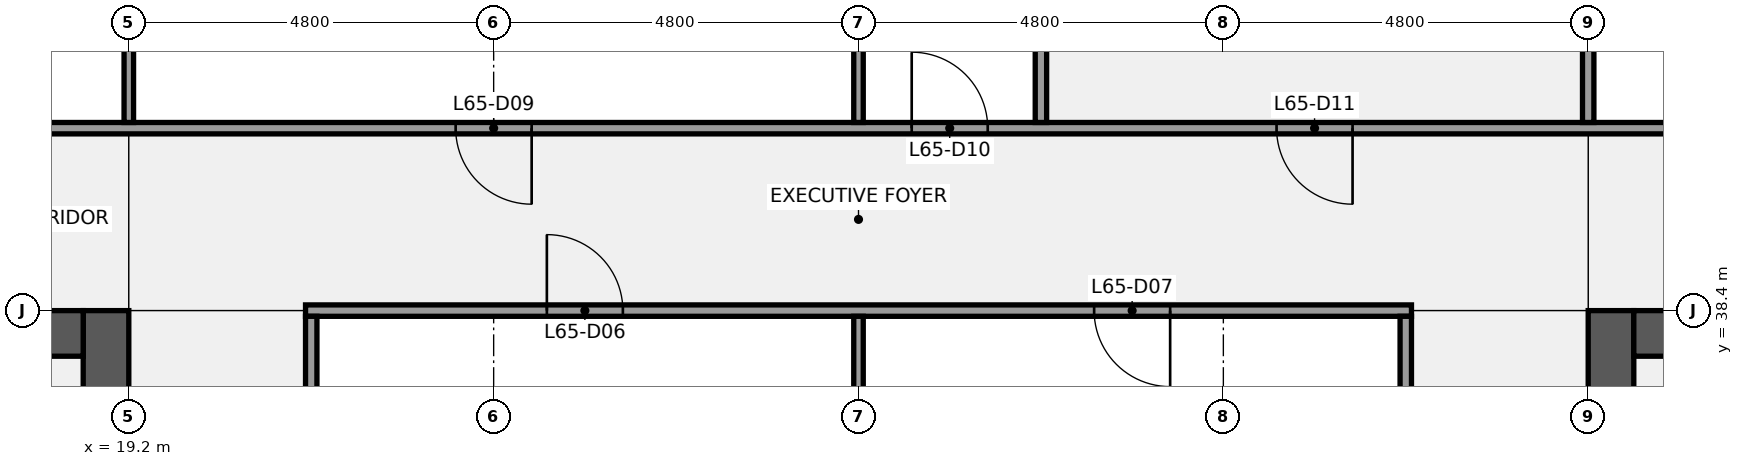
"""IFC4 building model, lengths in metres.
Left out: names, types, materials, properties, quantities, classifications, styles, units other than length and angle.
Written with IfcOpenShell. Run it as: python <this file> out.ifc"""

import sys

from ifc_helpers import new_model, si_unit, direction, frame, frame_2d, origin, place, context, subcontext, project, spatial, rectangle, extrude, element, fill, save


model = new_model("IFC4")
c1 = context("Model", 3, precision=1e-05, world=origin(), true_north=direction((0.0, 1.0)))
c2 = subcontext(c1, "Body", "Model", "MODEL_VIEW")
j1 = project(units=[si_unit("LENGTHUNIT", "METRE"), si_unit("PLANEANGLEUNIT", "RADIAN")], contexts=[c1])
p1 = place(None, origin())
s1 = spatial("IfcSite", under=j1, at=p1, CompositionType="ELEMENT")
p2 = place(p1, origin())
s2 = spatial("IfcBuilding", under=s1, at=p2, CompositionType="ELEMENT")
p3 = place(p2, frame((0.0, 0.0, 298.3)))
s3 = spatial("IfcBuildingStorey", under=s2, at=p3, CompositionType="ELEMENT", Elevation=298.3)
p4 = place(p3, frame((18.9, 38.4, 0.0), z_axis=(0.0, 0.0, 1.0), x_axis=(0.0, -1.0, 0.0)))
e1 = element("IfcWall", 1, at=p4, inside=s3, PredefinedType="SHEAR", context=c2, shape_type="SweptSolid", body=[
    extrude(rectangle(XDim=28.8, YDim=0.6, at=frame_2d((14.4, 0.0))), origin(), (0.0, 0.0, 1.0), 3.84),
])
p5 = place(p4, frame((18.3, 0.0, 0.0)))
e2 = element("IfcOpeningElement", 2, at=p5, cuts=e1, PredefinedType="OPENING", context=c2, shape_type="SweptSolid", body=[
    extrude(rectangle(XDim=1.8, YDim=2.1, at=frame_2d((0.9, 1.05))), frame((0.0, 0.31, 0.0), z_axis=(0.0, -1.0, 0.0), x_axis=(1.0, 0.0, 0.0)), (0.0, 0.0, 1.0), 0.62),
])
p6 = place(p4, frame((8.7, 0.0, 0.0)))
e3 = element("IfcOpeningElement", 3, at=p6, cuts=e1, PredefinedType="OPENING", context=c2, shape_type="SweptSolid", body=[
    extrude(rectangle(XDim=1.8, YDim=2.1, at=frame_2d((0.9, 1.05))), frame((0.0, 0.31, 0.0), z_axis=(0.0, -1.0, 0.0), x_axis=(1.0, 0.0, 0.0)), (0.0, 0.0, 1.0), 0.62),
])
p7 = place(p3, frame((14.4, 38.1, 0.0), z_axis=(0.0, 0.0, 1.0), x_axis=(1.0, 0.0, 0.0)))
e4 = element("IfcWall", 4, at=p7, inside=s3, PredefinedType="SHEAR", context=c2, shape_type="SweptSolid", body=[
    extrude(rectangle(XDim=4.2, YDim=0.6, at=frame_2d((2.1, 0.0))), origin(), (0.0, 0.0, 1.0), 3.84),
])
p8 = place(p7, frame((1.85, 0.0, 0.0)))
e5 = element("IfcOpeningElement", 5, at=p8, cuts=e4, PredefinedType="OPENING", context=c2, shape_type="SweptSolid", body=[
    extrude(rectangle(XDim=1.1, YDim=2.1, at=frame_2d((0.55, 1.05))), frame((0.0, 0.31, 0.0), z_axis=(0.0, -1.0, 0.0), x_axis=(1.0, 0.0, 0.0)), (0.0, 0.0, 1.0), 0.62),
])
p9 = place(p3, frame((38.7, 9.6, 0.0), z_axis=(0.0, 0.0, 1.0), x_axis=(0.0, 1.0, 0.0)))
e6 = element("IfcWall", 6, at=p9, inside=s3, PredefinedType="SHEAR", context=c2, shape_type="SweptSolid", body=[
    extrude(rectangle(XDim=28.8, YDim=0.6, at=frame_2d((14.4, 0.0))), origin(), (0.0, 0.0, 1.0), 3.84),
])
p10 = place(p9, frame((8.7, 0.0, 0.0)))
e7 = element("IfcOpeningElement", 7, at=p10, cuts=e6, PredefinedType="OPENING", context=c2, shape_type="SweptSolid", body=[
    extrude(rectangle(XDim=1.8, YDim=2.1, at=frame_2d((0.9, 1.05))), frame((0.0, 0.31, 0.0), z_axis=(0.0, -1.0, 0.0), x_axis=(1.0, 0.0, 0.0)), (0.0, 0.0, 1.0), 0.62),
])
p11 = place(p9, frame((18.3, 0.0, 0.0)))
e8 = element("IfcOpeningElement", 8, at=p11, cuts=e6, PredefinedType="OPENING", context=c2, shape_type="SweptSolid", body=[
    extrude(rectangle(XDim=1.8, YDim=2.1, at=frame_2d((0.9, 1.05))), frame((0.0, 0.31, 0.0), z_axis=(0.0, -1.0, 0.0), x_axis=(1.0, 0.0, 0.0)), (0.0, 0.0, 1.0), 0.62),
])
p12 = place(p3, frame((39.0, 38.1, 0.0), z_axis=(0.0, 0.0, 1.0), x_axis=(1.0, 0.0, 0.0)))
e9 = element("IfcWall", 9, at=p12, inside=s3, PredefinedType="SHEAR", context=c2, shape_type="SweptSolid", body=[
    extrude(rectangle(XDim=4.2, YDim=0.6, at=frame_2d((2.1, 0.0))), origin(), (0.0, 0.0, 1.0), 3.84),
])
p13 = place(p12, frame((1.25, 0.0, 0.0)))
e10 = element("IfcOpeningElement", 10, at=p13, cuts=e9, PredefinedType="OPENING", context=c2, shape_type="SweptSolid", body=[
    extrude(rectangle(XDim=1.1, YDim=2.1, at=frame_2d((0.55, 1.05))), frame((0.0, 0.31, 0.0), z_axis=(0.0, -1.0, 0.0), x_axis=(1.0, 0.0, 0.0)), (0.0, 0.0, 1.0), 0.62),
])
p14 = place(p3, frame((21.525, 38.4, 0.0), z_axis=(0.0, 0.0, 1.0), x_axis=(1.0, 0.0, 0.0)))
e11 = element("IfcWall", 11, at=p14, inside=s3, PredefinedType="PARTITIONING", context=c2, shape_type="SweptSolid", body=[
    extrude(rectangle(XDim=14.55, YDim=0.15, at=frame_2d((7.275, 0.0))), origin(), (0.0, 0.0, 1.0), 2.849),
])
p15 = place(p14, frame((3.175, 0.0, 0.0)))
e12 = element("IfcOpeningElement", 12, at=p15, cuts=e11, PredefinedType="OPENING", context=c2, shape_type="SweptSolid", body=[
    extrude(rectangle(XDim=1.0, YDim=2.1, at=frame_2d((0.5, 1.05))), frame((0.0, 0.085, 0.0), z_axis=(0.0, -1.0, 0.0), x_axis=(1.0, 0.0, 0.0)), (0.0, 0.0, 1.0), 0.17),
])
p16 = place(p14, frame((10.375, 0.0, 0.0)))
e13 = element("IfcOpeningElement", 13, at=p16, cuts=e11, PredefinedType="OPENING", context=c2, shape_type="SweptSolid", body=[
    extrude(rectangle(XDim=1.0, YDim=2.1, at=frame_2d((0.5, 1.05))), frame((0.0, 0.085, 0.0), z_axis=(0.0, -1.0, 0.0), x_axis=(1.0, 0.0, 0.0)), (0.0, 0.0, 1.0), 0.17),
])
p17 = place(p3, frame((14.5, 40.8, 0.0), z_axis=(0.0, 0.0, 1.0), x_axis=(1.0, 0.0, 0.0)))
e14 = element("IfcWall", 14, at=p17, inside=s3, PredefinedType="PARTITIONING", context=c2, shape_type="SweptSolid", body=[
    extrude(rectangle(XDim=28.6, YDim=0.15, at=frame_2d((14.3, 0.0))), origin(), (0.0, 0.0, 1.0), 2.849),
])
p18 = place(p17, frame((1.85, 0.0, 0.0)))
e15 = element("IfcOpeningElement", 15, at=p18, cuts=e14, PredefinedType="OPENING", context=c2, shape_type="SweptSolid", body=[
    extrude(rectangle(XDim=1.0, YDim=2.1, at=frame_2d((0.5, 1.05))), frame((0.0, 0.085, 0.0), z_axis=(0.0, -1.0, 0.0), x_axis=(1.0, 0.0, 0.0)), (0.0, 0.0, 1.0), 0.17),
])
p19 = place(p17, frame((9.0, 0.0, 0.0)))
e16 = element("IfcOpeningElement", 16, at=p19, cuts=e14, PredefinedType="OPENING", context=c2, shape_type="SweptSolid", body=[
    extrude(rectangle(XDim=1.0, YDim=2.1, at=frame_2d((0.5, 1.05))), frame((0.0, 0.085, 0.0), z_axis=(0.0, -1.0, 0.0), x_axis=(1.0, 0.0, 0.0)), (0.0, 0.0, 1.0), 0.17),
])
p20 = place(p17, frame((15.0, 0.0, 0.0)))
e17 = element("IfcOpeningElement", 17, at=p20, cuts=e14, PredefinedType="OPENING", context=c2, shape_type="SweptSolid", body=[
    extrude(rectangle(XDim=1.0, YDim=2.1, at=frame_2d((0.5, 1.05))), frame((0.0, 0.085, 0.0), z_axis=(0.0, -1.0, 0.0), x_axis=(1.0, 0.0, 0.0)), (0.0, 0.0, 1.0), 0.17),
])
p21 = place(p17, frame((19.8, 0.0, 0.0)))
e18 = element("IfcOpeningElement", 18, at=p21, cuts=e14, PredefinedType="OPENING", context=c2, shape_type="SweptSolid", body=[
    extrude(rectangle(XDim=1.0, YDim=2.1, at=frame_2d((0.5, 1.05))), frame((0.0, 0.085, 0.0), z_axis=(0.0, -1.0, 0.0), x_axis=(1.0, 0.0, 0.0)), (0.0, 0.0, 1.0), 0.17),
])
p22 = place(p17, frame((25.75, 0.0, 0.0)))
e19 = element("IfcOpeningElement", 19, at=p22, cuts=e14, PredefinedType="OPENING", context=c2, shape_type="SweptSolid", body=[
    extrude(rectangle(XDim=1.0, YDim=2.1, at=frame_2d((0.5, 1.05))), frame((0.0, 0.085, 0.0), z_axis=(0.0, -1.0, 0.0), x_axis=(1.0, 0.0, 0.0)), (0.0, 0.0, 1.0), 0.17),
])
p23 = place(p3, frame((19.2, 40.875, 0.0), z_axis=(0.0, 0.0, 1.0), x_axis=(0.0, 1.0, 0.0)))
e20 = element("IfcWall", 20, at=p23, inside=s3, PredefinedType="PARTITIONING", context=c2, shape_type="SweptSolid", body=[
    extrude(rectangle(XDim=2.225, YDim=0.125, at=frame_2d((1.113, 0.0))), origin(), (0.0, 0.0, 1.0), 2.849),
])
p24 = place(p3, frame((21.6, 33.675, 0.0), z_axis=(0.0, 0.0, 1.0), x_axis=(0.0, 1.0, 0.0)))
e21 = element("IfcWall", 21, at=p24, inside=s3, PredefinedType="PARTITIONING", context=c2, shape_type="SweptSolid", body=[
    extrude(rectangle(XDim=4.65, YDim=0.15, at=frame_2d((2.325, 0.0))), origin(), (0.0, 0.0, 1.0), 2.849),
])
p25 = place(p3, frame((28.8, 33.663, 0.0), z_axis=(0.0, 0.0, 1.0), x_axis=(0.0, 1.0, 0.0)))
e22 = element("IfcWall", 22, at=p25, inside=s3, PredefinedType="PARTITIONING", context=c2, shape_type="SweptSolid", body=[
    extrude(rectangle(XDim=4.662, YDim=0.125, at=frame_2d((2.331, 0.0))), origin(), (0.0, 0.0, 1.0), 2.849),
])
p26 = place(p3, frame((28.8, 40.875, 0.0), z_axis=(0.0, 0.0, 1.0), x_axis=(0.0, 1.0, 0.0)))
e23 = element("IfcWall", 23, at=p26, inside=s3, PredefinedType="PARTITIONING", context=c2, shape_type="SweptSolid", body=[
    extrude(rectangle(XDim=6.625, YDim=0.125, at=frame_2d((3.312, 0.0))), origin(), (0.0, 0.0, 1.0), 2.849),
])
p27 = place(p3, frame((31.2, 40.875, 0.0), z_axis=(0.0, 0.0, 1.0), x_axis=(0.0, 1.0, 0.0)))
e24 = element("IfcWall", 24, at=p27, inside=s3, PredefinedType="PARTITIONING", context=c2, shape_type="SweptSolid", body=[
    extrude(rectangle(XDim=3.45, YDim=0.15, at=frame_2d((1.725, 0.0))), origin(), (0.0, 0.0, 1.0), 2.849),
])
p28 = place(p3, frame((36.0, 33.675, 0.0), z_axis=(0.0, 0.0, 1.0), x_axis=(0.0, 1.0, 0.0)))
e25 = element("IfcWall", 25, at=p28, inside=s3, PredefinedType="PARTITIONING", context=c2, shape_type="SweptSolid", body=[
    extrude(rectangle(XDim=4.65, YDim=0.15, at=frame_2d((2.325, 0.0))), origin(), (0.0, 0.0, 1.0), 2.849),
])
p29 = place(p3, frame((38.4, 40.875, 0.0), z_axis=(0.0, 0.0, 1.0), x_axis=(0.0, 1.0, 0.0)))
e26 = element("IfcWall", 26, at=p29, inside=s3, PredefinedType="PARTITIONING", context=c2, shape_type="SweptSolid", body=[
    extrude(rectangle(XDim=2.225, YDim=0.15, at=frame_2d((1.113, 0.0))), origin(), (0.0, 0.0, 1.0), 2.849),
])
p30 = place(p15, origin())
e27 = element("IfcDoor", 27, at=p30, inside=s3, OperationType="SINGLE_SWING_LEFT", PredefinedType="DOOR", context=c2, shape_type="SweptSolid", body=[
    extrude(rectangle(XDim=1.0, YDim=2.1, at=frame_2d((0.5, 1.05))), frame((0.0, 0.025, 0.0), z_axis=(0.0, -1.0, 0.0), x_axis=(1.0, 0.0, 0.0)), (0.0, 0.0, 1.0), 0.05),
])
fill(e12, e27)
p31 = place(p16, origin())
e28 = element("IfcDoor", 28, at=p31, inside=s3, OperationType="SINGLE_SWING_RIGHT", PredefinedType="DOOR", context=c2, shape_type="SweptSolid", body=[
    extrude(rectangle(XDim=1.0, YDim=2.1, at=frame_2d((0.5, 1.05))), frame((0.0, 0.025, 0.0), z_axis=(0.0, -1.0, 0.0), x_axis=(1.0, 0.0, 0.0)), (0.0, 0.0, 1.0), 0.05),
])
fill(e13, e28)
p32 = place(p19, origin())
e29 = element("IfcDoor", 29, at=p32, inside=s3, OperationType="SINGLE_SWING_RIGHT", PredefinedType="DOOR", context=c2, shape_type="SweptSolid", body=[
    extrude(rectangle(XDim=1.0, YDim=2.1, at=frame_2d((0.5, 1.05))), frame((0.0, 0.025, 0.0), z_axis=(0.0, -1.0, 0.0), x_axis=(1.0, 0.0, 0.0)), (0.0, 0.0, 1.0), 0.05),
])
fill(e16, e29)
p33 = place(p20, origin())
e30 = element("IfcDoor", 30, at=p33, inside=s3, OperationType="SINGLE_SWING_LEFT", PredefinedType="DOOR", context=c2, shape_type="SweptSolid", body=[
    extrude(rectangle(XDim=1.0, YDim=2.1, at=frame_2d((0.5, 1.05))), frame((0.0, 0.025, 0.0), z_axis=(0.0, -1.0, 0.0), x_axis=(1.0, 0.0, 0.0)), (0.0, 0.0, 1.0), 0.05),
])
fill(e17, e30)
p34 = place(p21, origin())
e31 = element("IfcDoor", 31, at=p34, inside=s3, OperationType="SINGLE_SWING_RIGHT", PredefinedType="DOOR", context=c2, shape_type="SweptSolid", body=[
    extrude(rectangle(XDim=1.0, YDim=2.1, at=frame_2d((0.5, 1.05))), frame((0.0, 0.025, 0.0), z_axis=(0.0, -1.0, 0.0), x_axis=(1.0, 0.0, 0.0)), (0.0, 0.0, 1.0), 0.05),
])
fill(e18, e31)
save(model, sys.argv[1])
